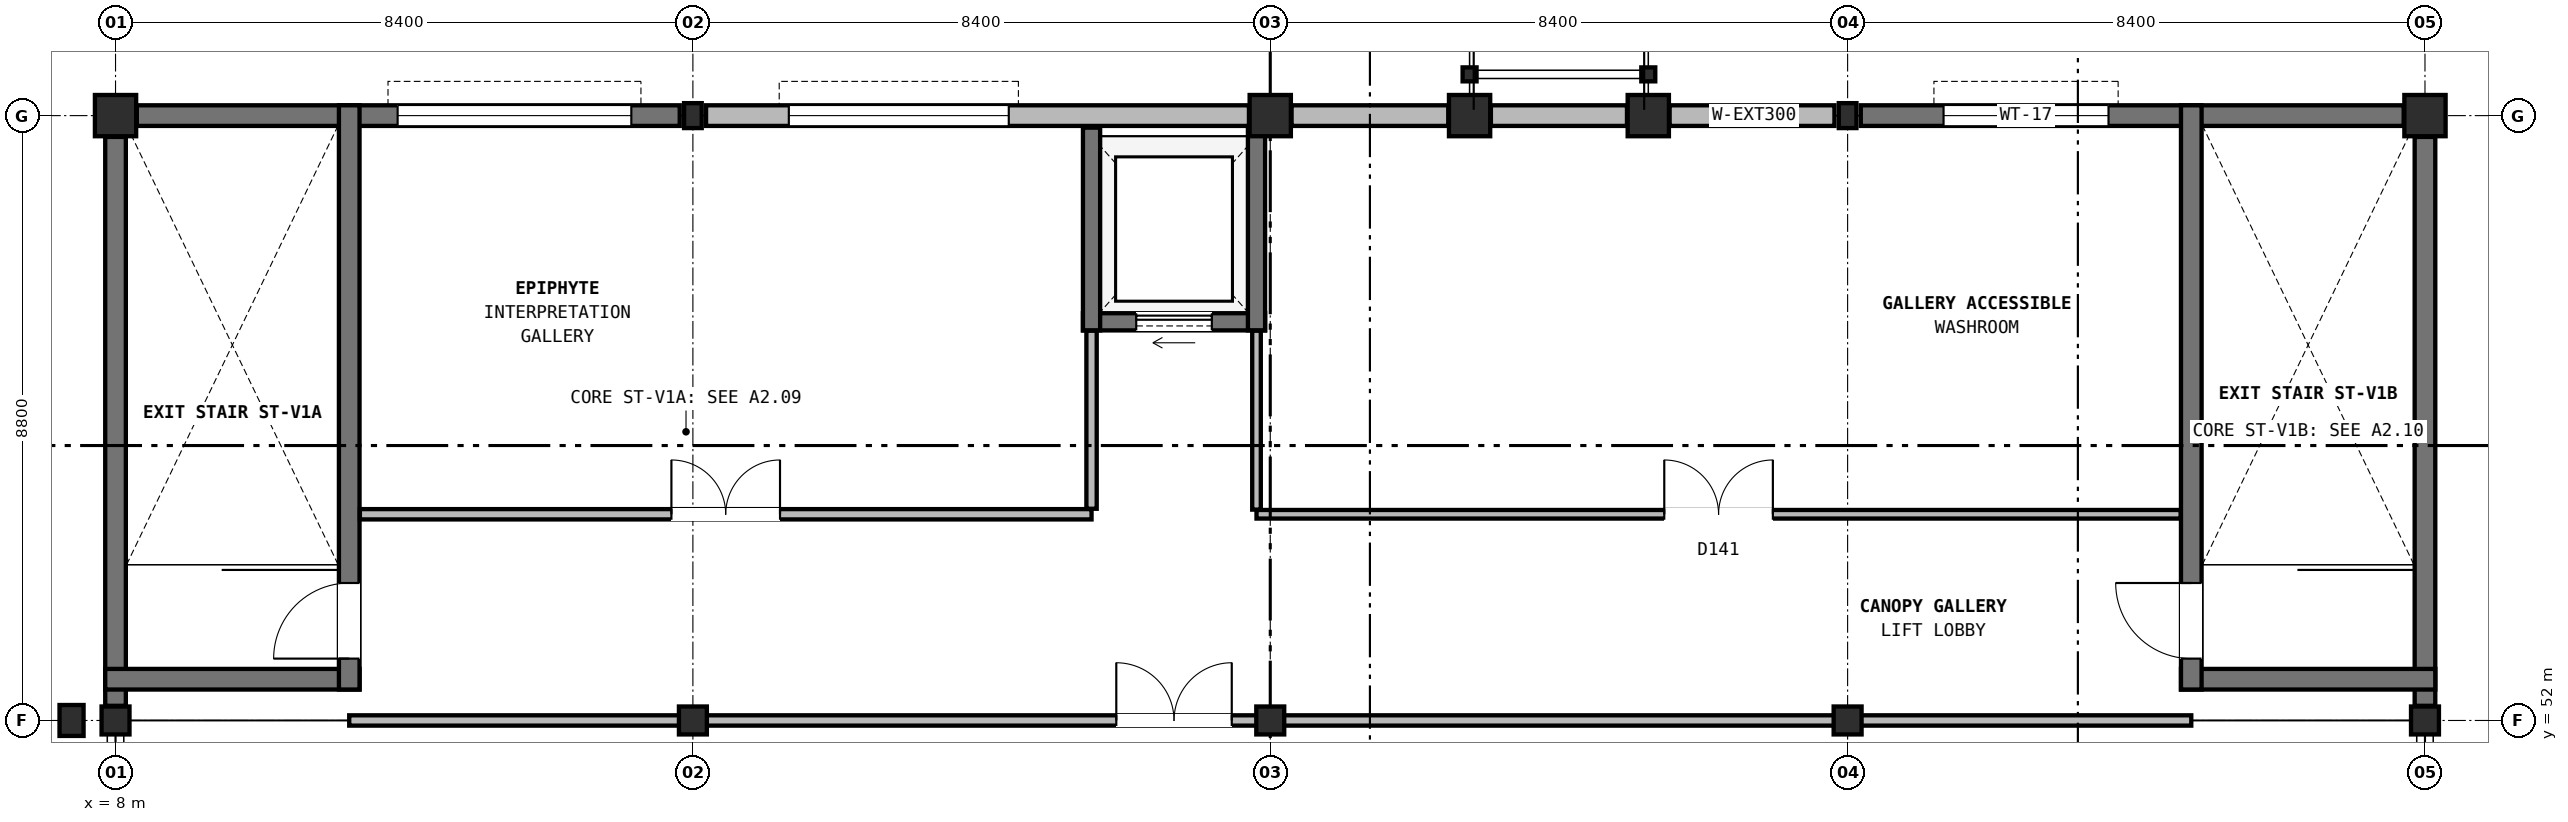
"""IFC4 building model, lengths in metres.
Left out: names, types, materials, properties, quantities, classifications, styles, units other than length and angle.
Written with IfcOpenShell. Run it as: python <this file> out.ifc"""

import sys

from ifc_helpers import new_model, si_unit, direction, frame, frame_2d, origin, origin_2d, place, context, subcontext, project, spatial, rectangle, hollow_rectangle, hollow_circle, i_section, extrude, element, fill, save


model = new_model("IFC4")
c1 = context("Model", 3, precision=1e-05, world=origin(), true_north=direction((0.0, 1.0)))
c2 = subcontext(c1, "Body", "Model", "MODEL_VIEW")
j1 = project(units=[si_unit("LENGTHUNIT", "METRE"), si_unit("PLANEANGLEUNIT", "RADIAN")], contexts=[c1])
p1 = place(None, origin())
s1 = spatial("IfcSite", under=j1, at=p1, CompositionType="ELEMENT")
p2 = place(p1, origin())
s2 = spatial("IfcBuilding", under=s1, at=p2, CompositionType="ELEMENT")
p3 = place(p2, frame((0.0, 0.0, 4.8)))
s3 = spatial("IfcBuildingStorey", under=s2, at=p3, CompositionType="ELEMENT", Elevation=4.8)
p4 = place(p3, frame((8.0, 52.0, 0.0), z_axis=(0.0, 0.0, 1.0), x_axis=(1.0, 0.0, 0.0)))
e1 = element("IfcColumn", 1, at=p4, inside=s3, PredefinedType="COLUMN", context=c2, shape_type="SweptSolid", body=[
    extrude(hollow_circle(Radius=0.203, WallThickness=0.016, at=origin_2d()), origin(), (0.0, 0.0, 1.0), 4.2),
])
p5 = place(p3, frame((7.36, 52.0, 0.0), z_axis=(0.0, 0.0, 1.0), x_axis=(1.0, 0.0, 0.0)))
e2 = element("IfcColumn", 2, at=p5, inside=s3, PredefinedType="PILASTER", context=c2, shape_type="SweptSolid", body=[
    extrude(rectangle(XDim=0.35, YDim=0.45, at=origin_2d()), origin(), (0.0, 0.0, 1.0), 4.2),
])
for number, where, z_axis, x_axis in (
    (3, (16.4, 52.0, 0.0), (0.0, 0.0, 1.0), (1.0, 0.0, 0.0)),
    (4, (24.8, 52.0, 0.0), (0.0, 0.0, 1.0), (1.0, 0.0, 0.0)),
    (5, (33.2, 52.0, 0.0), (0.0, 0.0, 1.0), (1.0, 0.0, 0.0)),
    (6, (41.6, 52.0, 0.0), (0.0, 0.0, 1.0), (1.0, 0.0, 0.0)),
):
    element("IfcColumn", number, at=place(p3, frame(where, z_axis=z_axis, x_axis=x_axis)), inside=s3, PredefinedType="COLUMN", context=c2, shape_type="SweptSolid", body=[
        extrude(hollow_circle(Radius=0.203, WallThickness=0.016, at=origin_2d()), origin(), (0.0, 0.0, 1.0), 4.2),
    ])
p6 = place(p3, frame((8.0, 60.8, 0.0), z_axis=(0.0, 0.0, 1.0), x_axis=(1.0, 0.0, 0.0)))
e7 = element("IfcColumn", 7, at=p6, inside=s3, PredefinedType="COLUMN", context=c2, shape_type="SweptSolid", body=[
    extrude(rectangle(XDim=0.6, YDim=0.6, at=origin_2d()), origin(), (0.0, 0.0, 1.0), 4.2),
])
p7 = place(p3, frame((16.4, 60.8, 0.0), z_axis=(0.0, 0.0, 1.0), x_axis=(1.0, 0.0, 0.0)))
e8 = element("IfcColumn", 8, at=p7, inside=s3, PredefinedType="COLUMN", context=c2, shape_type="SweptSolid", body=[
    extrude(i_section(OverallWidth=0.257, OverallDepth=0.363, WebThickness=0.013, FlangeThickness=0.022, FilletRadius=0.016, at=origin_2d()), origin(), (0.0, 0.0, 1.0), 4.2),
])
p8 = place(p3, frame((24.8, 60.8, 0.0), z_axis=(0.0, 0.0, 1.0), x_axis=(1.0, 0.0, 0.0)))
e9 = element("IfcColumn", 9, at=p8, inside=s3, PredefinedType="COLUMN", context=c2, shape_type="SweptSolid", body=[
    extrude(rectangle(XDim=0.6, YDim=0.6, at=origin_2d()), origin(), (0.0, 0.0, 1.0), 4.2),
])
p9 = place(p3, frame((33.2, 60.8, 0.0), z_axis=(0.0, 0.0, 1.0), x_axis=(1.0, 0.0, 0.0)))
e10 = element("IfcColumn", 10, at=p9, inside=s3, PredefinedType="COLUMN", context=c2, shape_type="SweptSolid", body=[
    extrude(i_section(OverallWidth=0.257, OverallDepth=0.363, WebThickness=0.013, FlangeThickness=0.022, FilletRadius=0.016, at=origin_2d()), origin(), (0.0, 0.0, 1.0), 4.2),
])
p10 = place(p3, frame((41.6, 60.8, 0.0), z_axis=(0.0, 0.0, 1.0), x_axis=(1.0, 0.0, 0.0)))
e11 = element("IfcColumn", 11, at=p10, inside=s3, PredefinedType="COLUMN", context=c2, shape_type="SweptSolid", body=[
    extrude(rectangle(XDim=0.6, YDim=0.6, at=origin_2d()), origin(), (0.0, 0.0, 1.0), 4.2),
])
for number, where, z_axis, x_axis in (
    (12, (27.7, 61.4, 0.0), (0.0, 0.0, 1.0), (1.0, 0.0, 0.0)),
    (13, (30.3, 61.4, 0.0), (0.0, 0.0, 1.0), (1.0, 0.0, 0.0)),
):
    element("IfcColumn", number, at=place(p3, frame(where, z_axis=z_axis, x_axis=x_axis)), inside=s3, PredefinedType="COLUMN", context=c2, shape_type="SweptSolid", body=[
        extrude(hollow_rectangle(XDim=0.203, YDim=0.203, WallThickness=0.013, InnerFilletRadius=0.013, OuterFilletRadius=0.025, at=origin_2d()), origin(), (0.0, 0.0, 1.0), 4.2),
    ])
for number, where, z_axis, x_axis in (
    (14, (27.7, 60.8, 0.0), (0.0, 0.0, 1.0), (1.0, 0.0, 0.0)),
    (15, (30.3, 60.8, 0.0), (0.0, 0.0, 1.0), (1.0, 0.0, 0.0)),
):
    element("IfcColumn", number, at=place(p3, frame(where, z_axis=z_axis, x_axis=x_axis)), inside=s3, PredefinedType="COLUMN", context=c2, shape_type="SweptSolid", body=[
        extrude(rectangle(XDim=0.6, YDim=0.6, at=origin_2d()), origin(), (0.0, 0.0, 1.0), 4.2),
    ])
p11 = place(p3, frame((41.6, 52.213, 0.0), z_axis=(0.0, 0.0, 1.0), x_axis=(0.0, 1.0, 0.0)))
e16 = element("IfcWall", 16, at=p11, inside=s3, PredefinedType="SHEAR", context=c2, shape_type="SweptSolid", body=[
    extrude(rectangle(XDim=8.277, YDim=0.3, at=frame_2d((4.138, 0.0))), origin(), (0.0, 0.0, 1.0), 3.55),
])
p12 = place(p3, frame((41.29, 60.8, 0.0), z_axis=(0.0, 0.0, 1.0), x_axis=(-1.0, 0.0, 0.0)))
e17 = element("IfcWall", 17, at=p12, inside=s3, PredefinedType="SHEAR", context=c2, shape_type="SweptSolid", body=[
    extrude(rectangle(XDim=7.898, YDim=0.3, at=frame_2d((3.949, 0.0))), origin(), (0.0, 0.0, 1.0), 3.55),
])
p13 = place(p12, frame((4.294, 0.0, 0.9)))
e18 = element("IfcOpeningElement", 18, at=p13, cuts=e17, PredefinedType="OPENING", context=c2, shape_type="SweptSolid", body=[
    extrude(rectangle(XDim=2.4, YDim=2.35, at=frame_2d((1.2, 1.175))), frame((0.0, 0.16, 0.0), z_axis=(0.0, -1.0, 0.0), x_axis=(1.0, 0.0, 0.0)), (0.0, 0.0, 1.0), 0.32),
])
p14 = place(p3, frame((33.009, 60.8, 0.0), z_axis=(0.0, 0.0, 1.0), x_axis=(-1.0, 0.0, 0.0)))
e19 = element("IfcWall", 19, at=p14, inside=s3, PredefinedType="SOLIDWALL", context=c2, shape_type="SweptSolid", body=[
    extrude(rectangle(XDim=2.398, YDim=0.3, at=frame_2d((1.199, 0.0))), origin(), (0.0, 0.0, 1.0), 3.55),
])
p15 = place(p3, frame((29.99, 60.8, 0.0), z_axis=(0.0, 0.0, 1.0), x_axis=(-1.0, 0.0, 0.0)))
e20 = element("IfcWall", 20, at=p15, inside=s3, PredefinedType="SOLIDWALL", context=c2, shape_type="SweptSolid", body=[
    extrude(rectangle(XDim=1.98, YDim=0.3, at=frame_2d((0.99, 0.0))), origin(), (0.0, 0.0, 1.0), 3.55),
])
p16 = place(p3, frame((27.39, 60.8, 0.0), z_axis=(0.0, 0.0, 1.0), x_axis=(-1.0, 0.0, 0.0)))
e21 = element("IfcWall", 21, at=p16, inside=s3, PredefinedType="SOLIDWALL", context=c2, shape_type="SweptSolid", body=[
    extrude(rectangle(XDim=2.28, YDim=0.3, at=frame_2d((1.14, 0.0))), origin(), (0.0, 0.0, 1.0), 3.55),
])
p17 = place(p3, frame((24.49, 60.8, 0.0), z_axis=(0.0, 0.0, 1.0), x_axis=(-1.0, 0.0, 0.0)))
e22 = element("IfcWall", 22, at=p17, inside=s3, PredefinedType="SOLIDWALL", context=c2, shape_type="SweptSolid", body=[
    extrude(rectangle(XDim=7.898, YDim=0.3, at=frame_2d((3.949, 0.0))), origin(), (0.0, 0.0, 1.0), 3.55),
])
p18 = place(p17, frame((3.494, 0.0, 0.9)))
e23 = element("IfcOpeningElement", 23, at=p18, cuts=e22, PredefinedType="OPENING", context=c2, shape_type="SweptSolid", body=[
    extrude(rectangle(XDim=3.2, YDim=2.1, at=frame_2d((1.6, 1.05))), frame((0.0, 0.16, 0.0), z_axis=(0.0, -1.0, 0.0), x_axis=(1.0, 0.0, 0.0)), (0.0, 0.0, 1.0), 0.32),
])
p19 = place(p3, frame((16.208, 60.8, 0.0), z_axis=(0.0, 0.0, 1.0), x_axis=(-1.0, 0.0, 0.0)))
e24 = element("IfcWall", 24, at=p19, inside=s3, PredefinedType="SHEAR", context=c2, shape_type="SweptSolid", body=[
    extrude(rectangle(XDim=7.898, YDim=0.3, at=frame_2d((3.949, 0.0))), origin(), (0.0, 0.0, 1.0), 3.55),
])
p20 = place(p19, frame((0.704, 0.0, 0.9)))
e25 = element("IfcOpeningElement", 25, at=p20, cuts=e24, PredefinedType="OPENING", context=c2, shape_type="SweptSolid", body=[
    extrude(rectangle(XDim=3.4, YDim=2.15, at=frame_2d((1.7, 1.075))), frame((0.0, 0.16, 0.0), z_axis=(0.0, -1.0, 0.0), x_axis=(1.0, 0.0, 0.0)), (0.0, 0.0, 1.0), 0.32),
])
p21 = place(p3, frame((8.0, 60.49, 0.0), z_axis=(0.0, 0.0, 1.0), x_axis=(0.0, -1.0, 0.0)))
e26 = element("IfcWall", 26, at=p21, inside=s3, PredefinedType="SHEAR", context=c2, shape_type="SweptSolid", body=[
    extrude(rectangle(XDim=8.277, YDim=0.3, at=frame_2d((4.138, 0.0))), origin(), (0.0, 0.0, 1.0), 3.55),
])
p22 = place(p3, frame((7.85, 52.6, 0.0), z_axis=(0.0, 0.0, 1.0), x_axis=(1.0, 0.0, 0.0)))
e27 = element("IfcWall", 27, at=p22, inside=s3, PredefinedType="SHEAR", context=c2, shape_type="SweptSolid", body=[
    extrude(rectangle(XDim=3.7, YDim=0.3, at=frame_2d((1.85, 0.0))), origin(), (0.0, 0.0, 1.0), 4.2),
])
p23 = place(p3, frame((11.4, 52.45, 0.0), z_axis=(0.0, 0.0, 1.0), x_axis=(0.0, 1.0, 0.0)))
e28 = element("IfcWall", 28, at=p23, inside=s3, PredefinedType="SHEAR", context=c2, shape_type="SweptSolid", body=[
    extrude(rectangle(XDim=8.5, YDim=0.3, at=frame_2d((4.25, 0.0))), origin(), (0.0, 0.0, 1.0), 4.2),
])
p24 = place(p23, frame((0.45, 0.0, 0.0)))
e29 = element("IfcOpeningElement", 29, at=p24, cuts=e28, PredefinedType="OPENING", context=c2, shape_type="SweptSolid", body=[
    extrude(rectangle(XDim=1.1, YDim=2.2, at=frame_2d((0.55, 1.1))), frame((0.0, 0.16, 0.0), z_axis=(0.0, -1.0, 0.0), x_axis=(1.0, 0.0, 0.0)), (0.0, 0.0, 1.0), 0.32),
])
p25 = place(p3, frame((38.05, 52.6, 0.0), z_axis=(0.0, 0.0, 1.0), x_axis=(1.0, 0.0, 0.0)))
e30 = element("IfcWall", 30, at=p25, inside=s3, PredefinedType="SHEAR", context=c2, shape_type="SweptSolid", body=[
    extrude(rectangle(XDim=3.7, YDim=0.3, at=frame_2d((1.85, 0.0))), origin(), (0.0, 0.0, 1.0), 4.2),
])
p26 = place(p3, frame((38.2, 52.45, 0.0), z_axis=(0.0, 0.0, 1.0), x_axis=(0.0, 1.0, 0.0)))
e31 = element("IfcWall", 31, at=p26, inside=s3, PredefinedType="SHEAR", context=c2, shape_type="SweptSolid", body=[
    extrude(rectangle(XDim=8.5, YDim=0.3, at=frame_2d((4.25, 0.0))), origin(), (0.0, 0.0, 1.0), 4.2),
])
p27 = place(p26, frame((0.45, 0.0, 0.0)))
e32 = element("IfcOpeningElement", 32, at=p27, cuts=e31, PredefinedType="OPENING", context=c2, shape_type="SweptSolid", body=[
    extrude(rectangle(XDim=1.1, YDim=2.2, at=frame_2d((0.55, 1.1))), frame((0.0, 0.16, 0.0), z_axis=(0.0, -1.0, 0.0), x_axis=(1.0, 0.0, 0.0)), (0.0, 0.0, 1.0), 0.32),
])
p28 = place(p3, frame((22.075, 57.8, 0.0), z_axis=(0.0, 0.0, 1.0), x_axis=(1.0, 0.0, 0.0)))
e33 = element("IfcWall", 33, at=p28, inside=s3, PredefinedType="SOLIDWALL", context=c2, shape_type="SweptSolid", body=[
    extrude(rectangle(XDim=2.65, YDim=0.25, at=frame_2d((1.325, 0.0))), origin(), (0.0, 0.0, 1.0), 3.88),
])
p29 = place(p28, frame((0.775, 0.0, 0.0)))
e34 = element("IfcOpeningElement", 34, at=p29, cuts=e33, PredefinedType="OPENING", context=c2, shape_type="SweptSolid", body=[
    extrude(rectangle(XDim=1.1, YDim=2.2, at=frame_2d((0.55, 1.1))), frame((0.0, 0.135, 0.0), z_axis=(0.0, -1.0, 0.0), x_axis=(1.0, 0.0, 0.0)), (0.0, 0.0, 1.0), 0.27),
])
for number, where, z_axis, x_axis in (
    (35, (22.2, 57.675, 0.0), (0.0, 0.0, 1.0), (0.0, 1.0, 0.0)),
    (36, (24.6, 57.675, 0.0), (0.0, 0.0, 1.0), (0.0, 1.0, 0.0)),
):
    element("IfcWall", number, at=place(p3, frame(where, z_axis=z_axis, x_axis=x_axis)), inside=s3, PredefinedType="SOLIDWALL", context=c2, shape_type="SweptSolid", body=[
        extrude(rectangle(XDim=2.95, YDim=0.25, at=frame_2d((1.475, 0.0))), origin(), (0.0, 0.0, 1.0), 3.88),
    ])
p30 = place(p3, frame((11.4, 52.0, 0.0), z_axis=(0.0, 0.0, 1.0), x_axis=(1.0, 0.0, 0.0)))
e37 = element("IfcWall", 37, at=p30, inside=s3, PredefinedType="PARTITIONING", context=c2, shape_type="SweptSolid", body=[
    extrude(rectangle(XDim=26.8, YDim=0.15, at=frame_2d((13.4, 0.0))), origin(), (0.0, 0.0, 1.0), 3.545),
])
p31 = place(p30, frame((11.16, 0.0, 0.0)))
e38 = element("IfcOpeningElement", 38, at=p31, cuts=e37, PredefinedType="OPENING", context=c2, shape_type="SweptSolid", body=[
    extrude(rectangle(XDim=1.68, YDim=2.3, at=frame_2d((0.84, 1.15))), frame((0.0, 0.085, 0.0), z_axis=(0.0, -1.0, 0.0), x_axis=(1.0, 0.0, 0.0)), (0.0, 0.0, 1.0), 0.17),
])
p32 = place(p3, frame((11.555, 55.0, 0.0), z_axis=(0.0, 0.0, 1.0), x_axis=(1.0, 0.0, 0.0)))
e39 = element("IfcWall", 39, at=p32, inside=s3, PredefinedType="PARTITIONING", context=c2, shape_type="SweptSolid", body=[
    extrude(rectangle(XDim=10.645, YDim=0.15, at=frame_2d((5.323, 0.0))), origin(), (0.0, 0.0, 1.0), 3.865),
])
p33 = place(p32, frame((4.532, 0.0, 0.0)))
e40 = element("IfcOpeningElement", 40, at=p33, cuts=e39, PredefinedType="OPENING", context=c2, shape_type="SweptSolid", body=[
    extrude(rectangle(XDim=1.58, YDim=2.25, at=frame_2d((0.79, 1.125))), frame((0.0, 0.085, 0.0), z_axis=(0.0, -1.0, 0.0), x_axis=(1.0, 0.0, 0.0)), (0.0, 0.0, 1.0), 0.17),
])
p34 = place(p3, frame((24.6, 55.0, 0.0), z_axis=(0.0, 0.0, 1.0), x_axis=(1.0, 0.0, 0.0)))
e41 = element("IfcWall", 41, at=p34, inside=s3, PredefinedType="PARTITIONING", context=c2, shape_type="SweptSolid", body=[
    extrude(rectangle(XDim=13.445, YDim=0.125, at=frame_2d((6.722, 0.0))), origin(), (0.0, 0.0, 1.0), 3.865),
])
p35 = place(p34, frame((5.933, 0.0, 0.0)))
e42 = element("IfcOpeningElement", 42, at=p35, cuts=e41, PredefinedType="OPENING", context=c2, shape_type="SweptSolid", body=[
    extrude(rectangle(XDim=1.58, YDim=2.25, at=frame_2d((0.79, 1.125))), frame((0.0, 0.073, 0.0), z_axis=(0.0, -1.0, 0.0), x_axis=(1.0, 0.0, 0.0)), (0.0, 0.0, 1.0), 0.145),
])
p36 = place(p3, frame((22.2, 55.08, 0.0), z_axis=(0.0, 0.0, 1.0), x_axis=(0.0, 1.0, 0.0)))
e43 = element("IfcWall", 43, at=p36, inside=s3, PredefinedType="PARTITIONING", context=c2, shape_type="SweptSolid", body=[
    extrude(rectangle(XDim=2.59, YDim=0.15, at=frame_2d((1.295, 0.0))), origin(), (0.0, 0.0, 1.0), 3.865),
])
p37 = place(p3, frame((24.6, 55.067, 0.0), z_axis=(0.0, 0.0, 1.0), x_axis=(0.0, 1.0, 0.0)))
e44 = element("IfcWall", 44, at=p37, inside=s3, PredefinedType="PARTITIONING", context=c2, shape_type="SweptSolid", body=[
    extrude(rectangle(XDim=2.603, YDim=0.125, at=frame_2d((1.301, 0.0))), origin(), (0.0, 0.0, 1.0), 3.545),
])
p38 = place(p13, origin())
e45 = element("IfcWindow", 45, at=p38, inside=s3, PartitioningType="SINGLE_PANEL", PredefinedType="WINDOW", context=c2, shape_type="SweptSolid", body=[
    extrude(rectangle(XDim=2.4, YDim=2.35, at=frame_2d((1.2, 1.175))), frame((0.0, 0.03, 0.0), z_axis=(0.0, -1.0, 0.0), x_axis=(1.0, 0.0, 0.0)), (0.0, 0.0, 1.0), 0.06),
])
fill(e18, e45)
p39 = place(p18, origin())
e46 = element("IfcWindow", 46, at=p39, inside=s3, PartitioningType="SINGLE_PANEL", PredefinedType="WINDOW", context=c2, shape_type="SweptSolid", body=[
    extrude(rectangle(XDim=3.2, YDim=2.1, at=frame_2d((1.6, 1.05))), frame((0.0, 0.03, 0.0), z_axis=(0.0, -1.0, 0.0), x_axis=(1.0, 0.0, 0.0)), (0.0, 0.0, 1.0), 0.06),
])
fill(e23, e46)
p40 = place(p20, origin())
e47 = element("IfcWindow", 47, at=p40, inside=s3, PartitioningType="SINGLE_PANEL", PredefinedType="WINDOW", context=c2, shape_type="SweptSolid", body=[
    extrude(rectangle(XDim=3.4, YDim=2.15, at=frame_2d((1.7, 1.075))), frame((0.0, 0.03, 0.0), z_axis=(0.0, -1.0, 0.0), x_axis=(1.0, 0.0, 0.0)), (0.0, 0.0, 1.0), 0.06),
])
fill(e25, e47)
p41 = place(p24, origin())
e48 = element("IfcDoor", 48, at=p41, inside=s3, OperationType="SINGLE_SWING_LEFT", PredefinedType="DOOR", context=c2, shape_type="SweptSolid", body=[
    extrude(rectangle(XDim=1.1, YDim=2.2, at=frame_2d((0.55, 1.1))), frame((0.0, 0.025, 0.0), z_axis=(0.0, -1.0, 0.0), x_axis=(1.0, 0.0, 0.0)), (0.0, 0.0, 1.0), 0.05),
])
fill(e29, e48)
p42 = place(p27, origin())
e49 = element("IfcDoor", 49, at=p42, inside=s3, OperationType="SINGLE_SWING_RIGHT", PredefinedType="DOOR", context=c2, shape_type="SweptSolid", body=[
    extrude(rectangle(XDim=1.1, YDim=2.2, at=frame_2d((0.55, 1.1))), frame((0.0, 0.025, 0.0), z_axis=(0.0, -1.0, 0.0), x_axis=(1.0, 0.0, 0.0)), (0.0, 0.0, 1.0), 0.05),
])
fill(e32, e49)
p43 = place(p29, origin())
e50 = element("IfcDoor", 50, at=p43, inside=s3, OperationType="SLIDING_TO_LEFT", PredefinedType="DOOR", context=c2, shape_type="SweptSolid", body=[
    extrude(rectangle(XDim=1.1, YDim=2.2, at=frame_2d((0.55, 1.1))), frame((0.0, 0.025, 0.0), z_axis=(0.0, -1.0, 0.0), x_axis=(1.0, 0.0, 0.0)), (0.0, 0.0, 1.0), 0.05),
])
fill(e34, e50)
p44 = place(p31, origin())
e51 = element("IfcDoor", 51, at=p44, inside=s3, OperationType="DOUBLE_DOOR_SINGLE_SWING", PredefinedType="DOOR", context=c2, shape_type="SweptSolid", body=[
    extrude(rectangle(XDim=1.68, YDim=2.3, at=frame_2d((0.84, 1.15))), frame((0.0, 0.025, 0.0), z_axis=(0.0, -1.0, 0.0), x_axis=(1.0, 0.0, 0.0)), (0.0, 0.0, 1.0), 0.05),
])
fill(e38, e51)
p45 = place(p33, origin())
e52 = element("IfcDoor", 52, at=p45, inside=s3, OperationType="DOUBLE_DOOR_SINGLE_SWING", PredefinedType="DOOR", context=c2, shape_type="SweptSolid", body=[
    extrude(rectangle(XDim=1.58, YDim=2.25, at=frame_2d((0.79, 1.125))), frame((0.0, 0.025, 0.0), z_axis=(0.0, -1.0, 0.0), x_axis=(1.0, 0.0, 0.0)), (0.0, 0.0, 1.0), 0.05),
])
fill(e40, e52)
p46 = place(p35, origin())
e53 = element("IfcDoor", 53, at=p46, inside=s3, OperationType="DOUBLE_DOOR_SINGLE_SWING", PredefinedType="DOOR", context=c2, shape_type="SweptSolid", body=[
    extrude(rectangle(XDim=1.58, YDim=2.25, at=frame_2d((0.79, 1.125))), frame((0.0, 0.025, 0.0), z_axis=(0.0, -1.0, 0.0), x_axis=(1.0, 0.0, 0.0)), (0.0, 0.0, 1.0), 0.05),
])
fill(e42, e53)
save(model, sys.argv[1])
